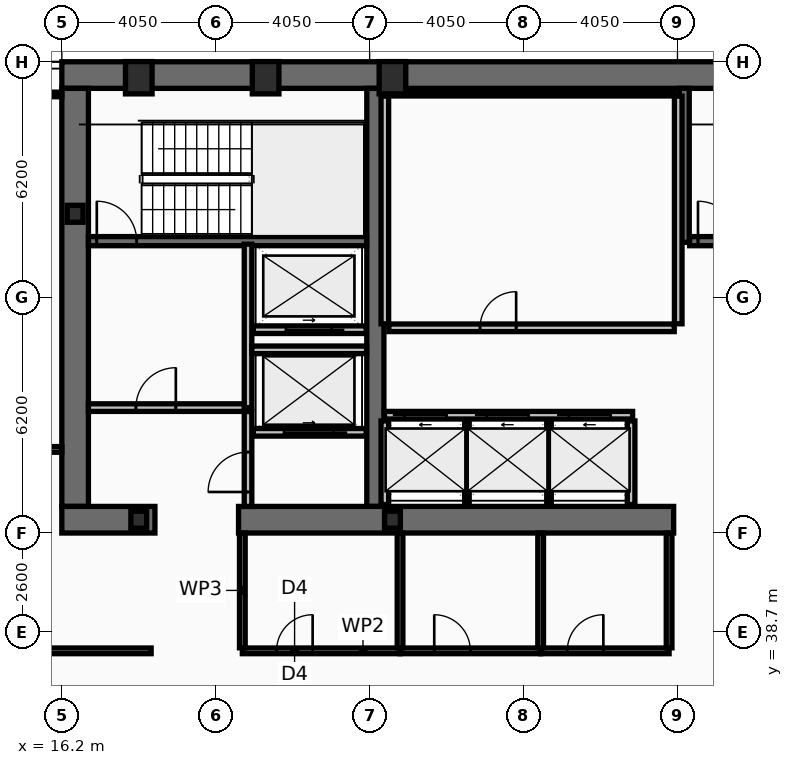
"""IFC4 building model, lengths in metres.
Left out: names, types, materials, properties, quantities, classifications, styles, units other than length and angle.
Written with IfcOpenShell. Run it as: python <this file> out.ifc"""

import sys

from ifc_helpers import new_model, si_unit, direction, frame, frame_2d, origin, origin_2d, place, context, subcontext, project, spatial, rectangle, hollow_rectangle, i_section, extrude, element, fill, save


model = new_model("IFC4")
c1 = context("Model", 3, precision=1e-05, world=origin(), true_north=direction((0.0, 1.0)))
c2 = subcontext(c1, "Body", "Model", "MODEL_VIEW")
j1 = project(units=[si_unit("LENGTHUNIT", "METRE"), si_unit("PLANEANGLEUNIT", "RADIAN")], contexts=[c1])
p1 = place(None, origin())
s1 = spatial("IfcSite", under=j1, at=p1, CompositionType="ELEMENT")
p2 = place(p1, origin())
s2 = spatial("IfcBuilding", under=s1, at=p2, CompositionType="ELEMENT")
p3 = place(p2, frame((0.0, 0.0, 139.8)))
s3 = spatial("IfcBuildingStorey", under=s2, at=p3, CompositionType="ELEMENT", Elevation=139.8)
p4 = place(p3, frame((16.2, 53.35, 0.0), z_axis=(0.0, 0.0, 1.0), x_axis=(1.0, 0.0, 0.0)))
e1 = element("IfcWall", 1, at=p4, inside=s3, PredefinedType="SHEAR", context=c2, shape_type="SweptSolid", body=[
    extrude(rectangle(XDim=40.5, YDim=0.7, at=frame_2d((20.25, 0.0))), origin(), (0.0, 0.0, 1.0), 3.44),
])
p5 = place(p3, frame((16.55, 42.0, 0.0), z_axis=(0.0, 0.0, 1.0), x_axis=(0.0, 1.0, 0.0)))
e2 = element("IfcWall", 2, at=p5, inside=s3, PredefinedType="SHEAR", context=c2, shape_type="SweptSolid", body=[
    extrude(rectangle(XDim=11.0, YDim=0.7, at=frame_2d((5.5, 0.0))), origin(), (0.0, 0.0, 1.0), 3.44),
])
p6 = place(p3, frame((24.45, 42.0, 0.0), z_axis=(0.0, 0.0, 1.0), x_axis=(0.0, 1.0, 0.0)))
e3 = element("IfcWall", 3, at=p6, inside=s3, PredefinedType="SHEAR", context=c2, shape_type="SweptSolid", body=[
    extrude(rectangle(XDim=11.0, YDim=0.45, at=frame_2d((5.5, 0.0))), origin(), (0.0, 0.0, 1.0), 3.44),
])
p7 = place(p3, frame((18.65, 41.65, 0.0), z_axis=(0.0, 0.0, 1.0), x_axis=(-1.0, 0.0, 0.0)))
e4 = element("IfcWall", 4, at=p7, inside=s3, PredefinedType="SHEAR", context=c2, shape_type="SweptSolid", body=[
    extrude(rectangle(XDim=2.45, YDim=0.7, at=frame_2d((1.225, 0.0))), origin(), (0.0, 0.0, 1.0), 3.44),
])
p8 = place(p3, frame((32.3, 41.65, 0.0), z_axis=(0.0, 0.0, 1.0), x_axis=(-1.0, 0.0, 0.0)))
e5 = element("IfcWall", 5, at=p8, inside=s3, PredefinedType="SHEAR", context=c2, shape_type="SweptSolid", body=[
    extrude(rectangle(XDim=11.45, YDim=0.7, at=frame_2d((5.725, 0.0))), origin(), (0.0, 0.0, 1.0), 3.44),
])
p9 = place(p3, frame((32.58, 48.95, 0.0), z_axis=(0.0, 0.0, 1.0), x_axis=(0.0, 1.0, 0.0)))
e6 = element("IfcWall", 6, at=p9, inside=s3, PredefinedType="SHEAR", context=c2, shape_type="SweptSolid", body=[
    extrude(rectangle(XDim=4.05, YDim=0.26, at=frame_2d((2.025, 0.0))), origin(), (0.0, 0.0, 1.0), 3.44),
])
p10 = place(p3, frame((16.9, 48.98, 0.0), z_axis=(0.0, 0.0, 1.0), x_axis=(1.0, 0.0, 0.0)))
e7 = element("IfcWall", 7, at=p10, inside=s3, PredefinedType="SHEAR", context=c2, shape_type="SweptSolid", body=[
    extrude(rectangle(XDim=7.32, YDim=0.24, at=frame_2d((3.66, 0.0))), origin(), (0.0, 0.0, 1.0), 3.44),
])
p11 = place(p10, frame((0.22, 0.0, 0.0)))
e8 = element("IfcOpeningElement", 8, at=p11, cuts=e7, PredefinedType="OPENING", context=c2, shape_type="SweptSolid", body=[
    extrude(rectangle(XDim=1.05, YDim=2.15, at=frame_2d((0.525, 1.075))), frame((0.0, 0.13, 0.0), z_axis=(0.0, -1.0, 0.0), x_axis=(1.0, 0.0, 0.0)), (0.0, 0.0, 1.0), 0.26),
])
p12 = place(p3, frame((32.72, 48.98, 0.0), z_axis=(0.0, 0.0, 1.0), x_axis=(1.0, 0.0, 0.0)))
e9 = element("IfcWall", 9, at=p12, inside=s3, PredefinedType="SHEAR", context=c2, shape_type="SweptSolid", body=[
    extrude(rectangle(XDim=7.56, YDim=0.24, at=frame_2d((3.78, 0.0))), origin(), (0.0, 0.0, 1.0), 3.44),
])
p13 = place(p12, frame((0.22, 0.0, 0.0)))
e10 = element("IfcOpeningElement", 10, at=p13, cuts=e9, PredefinedType="OPENING", context=c2, shape_type="SweptSolid", body=[
    extrude(rectangle(XDim=1.05, YDim=2.15, at=frame_2d((0.525, 1.075))), frame((0.0, 0.13, 0.0), z_axis=(0.0, -1.0, 0.0), x_axis=(1.0, 0.0, 0.0)), (0.0, 0.0, 1.0), 0.26),
])
for number, where, z_axis, x_axis in (
    (11, (18.225, 53.28, 0.0), (0.0, 0.0, 1.0), (1.0, 0.0, 0.0)),
    (12, (21.562, 53.28, 0.0), (0.0, 0.0, 1.0), (1.0, 0.0, 0.0)),
    (13, (24.9, 53.28, 0.0), (0.0, 0.0, 1.0), (1.0, 0.0, 0.0)),
):
    element("IfcColumn", number, at=place(p3, frame(where, z_axis=z_axis, x_axis=x_axis)), inside=s3, PredefinedType="COLUMN", context=c2, shape_type="SweptSolid", body=[
        extrude(hollow_rectangle(XDim=0.7, YDim=0.85, WallThickness=0.05, at=origin_2d()), origin(), (0.0, 0.0, 1.0), 3.6),
    ])
for number, where, z_axis, x_axis in (
    (14, (16.55, 49.7, 0.0), (0.0, 0.0, 1.0), (1.0, 0.0, 0.0)),
    (15, (18.225, 41.65, 0.0), (0.0, 0.0, 1.0), (1.0, 0.0, 0.0)),
    (16, (24.9, 41.65, 0.0), (0.0, 0.0, 1.0), (1.0, 0.0, 0.0)),
):
    element("IfcColumn", number, at=place(p3, frame(where, z_axis=z_axis, x_axis=x_axis)), inside=s3, PredefinedType="COLUMN", context=c2, shape_type="SweptSolid", body=[
        extrude(i_section(OverallWidth=0.416, OverallDepth=0.446, WebThickness=0.039, FlangeThickness=0.063, at=origin_2d()), origin(), (0.0, 0.0, 1.0), 3.6),
    ])
p14 = place(p3, frame((24.69, 44.4, 0.0), z_axis=(0.0, 0.0, 1.0), x_axis=(1.0, 0.0, 0.0)))
e17 = element("IfcWall", 17, at=p14, inside=s3, PredefinedType="PARTITIONING", context=c2, shape_type="SweptSolid", body=[
    extrude(rectangle(XDim=6.53, YDim=0.2, at=frame_2d((3.265, 0.0))), origin(), (0.0, 0.0, 1.0), 3.44),
])
p15 = place(p14, frame((0.53, 0.0, 0.0)))
e18 = element("IfcOpeningElement", 18, at=p15, cuts=e17, PredefinedType="OPENING", context=c2, shape_type="SweptSolid", body=[
    extrude(rectangle(XDim=1.1, YDim=2.18, at=frame_2d((0.55, 1.09))), frame((0.0, 0.11, 0.0), z_axis=(0.0, -1.0, 0.0), x_axis=(1.0, 0.0, 0.0)), (0.0, 0.0, 1.0), 0.22),
])
p16 = place(p14, frame((2.69, 0.0, 0.0)))
e19 = element("IfcOpeningElement", 19, at=p16, cuts=e17, PredefinedType="OPENING", context=c2, shape_type="SweptSolid", body=[
    extrude(rectangle(XDim=1.1, YDim=2.18, at=frame_2d((0.55, 1.09))), frame((0.0, 0.11, 0.0), z_axis=(0.0, -1.0, 0.0), x_axis=(1.0, 0.0, 0.0)), (0.0, 0.0, 1.0), 0.22),
])
p17 = place(p14, frame((4.85, 0.0, 0.0)))
e20 = element("IfcOpeningElement", 20, at=p17, cuts=e17, PredefinedType="OPENING", context=c2, shape_type="SweptSolid", body=[
    extrude(rectangle(XDim=1.1, YDim=2.18, at=frame_2d((0.55, 1.09))), frame((0.0, 0.11, 0.0), z_axis=(0.0, -1.0, 0.0), x_axis=(1.0, 0.0, 0.0)), (0.0, 0.0, 1.0), 0.22),
])
p18 = place(p3, frame((24.21, 43.95, 0.0), z_axis=(0.0, 0.0, 1.0), x_axis=(-1.0, 0.0, 0.0)))
e21 = element("IfcWall", 21, at=p18, inside=s3, PredefinedType="PARTITIONING", context=c2, shape_type="SweptSolid", body=[
    extrude(rectangle(XDim=2.97, YDim=0.2, at=frame_2d((1.485, 0.0))), origin(), (0.0, 0.0, 1.0), 3.44),
])
p19 = place(p18, frame((0.86, 0.0, 0.0)))
e22 = element("IfcOpeningElement", 22, at=p19, cuts=e21, PredefinedType="OPENING", context=c2, shape_type="SweptSolid", body=[
    extrude(rectangle(XDim=1.3, YDim=2.18, at=frame_2d((0.65, 1.09))), frame((0.0, 0.11, 0.0), z_axis=(0.0, -1.0, 0.0), x_axis=(1.0, 0.0, 0.0)), (0.0, 0.0, 1.0), 0.22),
])
p20 = place(p3, frame((24.21, 46.65, 0.0), z_axis=(0.0, 0.0, 1.0), x_axis=(-1.0, 0.0, 0.0)))
e23 = element("IfcWall", 23, at=p20, inside=s3, PredefinedType="PARTITIONING", context=c2, shape_type="SweptSolid", body=[
    extrude(rectangle(XDim=2.97, YDim=0.2, at=frame_2d((1.485, 0.0))), origin(), (0.0, 0.0, 1.0), 3.44),
])
p21 = place(p20, frame((0.91, 0.0, 0.0)))
e24 = element("IfcOpeningElement", 24, at=p21, cuts=e23, PredefinedType="OPENING", context=c2, shape_type="SweptSolid", body=[
    extrude(rectangle(XDim=1.2, YDim=2.18, at=frame_2d((0.6, 1.09))), frame((0.0, 0.11, 0.0), z_axis=(0.0, -1.0, 0.0), x_axis=(1.0, 0.0, 0.0)), (0.0, 0.0, 1.0), 0.22),
])
p22 = place(p3, frame((21.1, 44.6, 0.0), z_axis=(0.0, 0.0, 1.0), x_axis=(0.0, 1.0, 0.0)))
e25 = element("IfcWall", 25, at=p22, inside=s3, PredefinedType="PARTITIONING", context=c2, shape_type="SweptSolid", body=[
    extrude(rectangle(XDim=4.3, YDim=0.2, at=frame_2d((2.15, 0.0))), origin(), (0.0, 0.0, 1.0), 3.44),
])
p23 = place(p3, frame((16.9, 44.6, 0.0), z_axis=(0.0, 0.0, 1.0), x_axis=(1.0, 0.0, 0.0)))
e26 = element("IfcWall", 26, at=p23, inside=s3, PredefinedType="PARTITIONING", context=c2, shape_type="SweptSolid", body=[
    extrude(rectangle(XDim=4.1, YDim=0.2, at=frame_2d((2.05, 0.0))), origin(), (0.0, 0.0, 1.0), 3.44),
])
p24 = place(p23, frame((1.25, 0.0, 0.0)))
e27 = element("IfcOpeningElement", 27, at=p24, cuts=e26, PredefinedType="OPENING", context=c2, shape_type="SweptSolid", body=[
    extrude(rectangle(XDim=1.05, YDim=2.15, at=frame_2d((0.525, 1.075))), frame((0.0, 0.11, 0.0), z_axis=(0.0, -1.0, 0.0), x_axis=(1.0, 0.0, 0.0)), (0.0, 0.0, 1.0), 0.22),
])
p25 = place(p3, frame((21.2, 46.12, 0.0), z_axis=(0.0, 0.0, 1.0), x_axis=(1.0, 0.0, 0.0)))
e28 = element("IfcWall", 28, at=p25, inside=s3, PredefinedType="PARTITIONING", context=c2, shape_type="SweptSolid", body=[
    extrude(rectangle(XDim=3.02, YDim=0.2, at=frame_2d((1.51, 0.0))), origin(), (0.0, 0.0, 1.0), 3.44),
])
p26 = place(p3, frame((21.1, 42.0, 0.0), z_axis=(0.0, 0.0, 1.0), x_axis=(0.0, 1.0, 0.0)))
e29 = element("IfcWall", 29, at=p26, inside=s3, PredefinedType="PARTITIONING", context=c2, shape_type="SweptSolid", body=[
    extrude(rectangle(XDim=2.495, YDim=0.2, at=frame_2d((1.248, 0.0))), origin(), (0.0, 0.0, 1.0), 3.44),
])
p27 = place(p26, frame((0.38, 0.0, 0.0)))
e30 = element("IfcOpeningElement", 30, at=p27, cuts=e29, PredefinedType="OPENING", context=c2, shape_type="SweptSolid", body=[
    extrude(rectangle(XDim=1.05, YDim=2.15, at=frame_2d((0.525, 1.075))), frame((0.0, 0.11, 0.0), z_axis=(0.0, -1.0, 0.0), x_axis=(1.0, 0.0, 0.0)), (0.0, 0.0, 1.0), 0.22),
])
for number, where, z_axis, x_axis in (
    (31, (24.7, 46.805, 0.0), (0.0, 0.0, 1.0), (0.0, 1.0, 0.0)),
    (32, (32.42, 46.805, 0.0), (0.0, 0.0, 1.0), (0.0, 1.0, 0.0)),
):
    element("IfcWall", number, at=place(p3, frame(where, z_axis=z_axis, x_axis=x_axis)), inside=s3, PredefinedType="PARTITIONING", context=c2, shape_type="SweptSolid", body=[
        extrude(rectangle(XDim=5.99, YDim=0.2, at=frame_2d((2.995, 0.0))), origin(), (0.0, 0.0, 1.0), 3.44),
    ])
p28 = place(p3, frame((24.805, 52.86, 0.0), z_axis=(0.0, 0.0, 1.0), x_axis=(1.0, 0.0, 0.0)))
e33 = element("IfcWall", 33, at=p28, inside=s3, PredefinedType="PARTITIONING", context=c2, shape_type="SweptSolid", body=[
    extrude(rectangle(XDim=7.51, YDim=0.12, at=frame_2d((3.755, 0.0))), origin(), (0.0, 0.0, 1.0), 3.44),
])
p29 = place(p3, frame((24.805, 46.7, 0.0), z_axis=(0.0, 0.0, 1.0), x_axis=(1.0, 0.0, 0.0)))
e34 = element("IfcWall", 34, at=p29, inside=s3, PredefinedType="PARTITIONING", context=c2, shape_type="SweptSolid", body=[
    extrude(rectangle(XDim=7.51, YDim=0.2, at=frame_2d((3.755, 0.0))), origin(), (0.0, 0.0, 1.0), 3.44),
])
p30 = place(p29, frame((2.4, 0.0, 0.0)))
e35 = element("IfcOpeningElement", 35, at=p30, cuts=e34, PredefinedType="OPENING", context=c2, shape_type="SweptSolid", body=[
    extrude(rectangle(XDim=0.95, YDim=2.1, at=frame_2d((0.475, 1.05))), frame((0.0, 0.11, 0.0), z_axis=(0.0, -1.0, 0.0), x_axis=(1.0, 0.0, 0.0)), (0.0, 0.0, 1.0), 0.22),
])
for number, where, z_axis, x_axis in (
    (36, (24.7, 42.05, 0.0), (0.0, 0.0, 1.0), (0.0, 1.0, 0.0)),
    (37, (31.18, 42.05, 0.0), (0.0, 0.0, 1.0), (0.0, 1.0, 0.0)),
):
    element("IfcWall", number, at=place(p3, frame(where, z_axis=z_axis, x_axis=x_axis)), inside=s3, PredefinedType="PARTITIONING", context=c2, shape_type="SweptSolid", body=[
        extrude(rectangle(XDim=2.2, YDim=0.2, at=frame_2d((1.1, 0.0))), origin(), (0.0, 0.0, 1.0), 3.44),
    ])
for number, where, z_axis, x_axis in (
    (38, (26.86, 42.05, 0.0), (0.0, 0.0, 1.0), (0.0, 1.0, 0.0)),
    (39, (29.02, 42.05, 0.0), (0.0, 0.0, 1.0), (0.0, 1.0, 0.0)),
):
    element("IfcWall", number, at=place(p3, frame(where, z_axis=z_axis, x_axis=x_axis)), inside=s3, PredefinedType="PARTITIONING", context=c2, shape_type="SweptSolid", body=[
        extrude(rectangle(XDim=2.2, YDim=0.12, at=frame_2d((1.1, 0.0))), origin(), (0.0, 0.0, 1.0), 3.44),
    ])
p31 = place(p3, frame((20.95, 38.2, 0.0), z_axis=(0.0, 0.0, 1.0), x_axis=(1.0, 0.0, 0.0)))
e40 = element("IfcWall", 40, at=p31, inside=s3, PredefinedType="PARTITIONING", context=c2, shape_type="SweptSolid", body=[
    extrude(rectangle(XDim=4.15, YDim=0.15, at=frame_2d((2.075, 0.0))), origin(), (0.0, 0.0, 1.0), 2.73),
])
p32 = place(p31, frame((0.9, 0.0, 0.0)))
e41 = element("IfcOpeningElement", 41, at=p32, cuts=e40, PredefinedType="OPENING", context=c2, shape_type="SweptSolid", body=[
    extrude(rectangle(XDim=0.95, YDim=2.05, at=frame_2d((0.475, 1.025))), frame((0.0, 0.085, 0.0), z_axis=(0.0, -1.0, 0.0), x_axis=(1.0, 0.0, 0.0)), (0.0, 0.0, 1.0), 0.17),
])
p33 = place(p3, frame((25.1, 38.2, 0.0), z_axis=(0.0, 0.0, 1.0), x_axis=(1.0, 0.0, 0.0)))
e42 = element("IfcWall", 42, at=p33, inside=s3, PredefinedType="PARTITIONING", context=c2, shape_type="SweptSolid", body=[
    extrude(rectangle(XDim=3.7, YDim=0.15, at=frame_2d((1.85, 0.0))), origin(), (0.0, 0.0, 1.0), 2.73),
])
p34 = place(p33, frame((0.9, 0.0, 0.0)))
e43 = element("IfcOpeningElement", 43, at=p34, cuts=e42, PredefinedType="OPENING", context=c2, shape_type="SweptSolid", body=[
    extrude(rectangle(XDim=0.95, YDim=2.05, at=frame_2d((0.475, 1.025))), frame((0.0, 0.085, 0.0), z_axis=(0.0, -1.0, 0.0), x_axis=(1.0, 0.0, 0.0)), (0.0, 0.0, 1.0), 0.17),
])
p35 = place(p3, frame((28.8, 38.2, 0.0), z_axis=(0.0, 0.0, 1.0), x_axis=(1.0, 0.0, 0.0)))
e44 = element("IfcWall", 44, at=p35, inside=s3, PredefinedType="PARTITIONING", context=c2, shape_type="SweptSolid", body=[
    extrude(rectangle(XDim=3.38, YDim=0.15, at=frame_2d((1.69, 0.0))), origin(), (0.0, 0.0, 1.0), 2.73),
])
p36 = place(p35, frame((0.7, 0.0, 0.0)))
e45 = element("IfcOpeningElement", 45, at=p36, cuts=e44, PredefinedType="OPENING", context=c2, shape_type="SweptSolid", body=[
    extrude(rectangle(XDim=0.95, YDim=2.05, at=frame_2d((0.475, 1.025))), frame((0.0, 0.085, 0.0), z_axis=(0.0, -1.0, 0.0), x_axis=(1.0, 0.0, 0.0)), (0.0, 0.0, 1.0), 0.17),
])
p37 = place(p3, frame((20.95, 38.28, 0.0), z_axis=(0.0, 0.0, 1.0), x_axis=(0.0, 1.0, 0.0)))
e46 = element("IfcWall", 46, at=p37, inside=s3, PredefinedType="PARTITIONING", context=c2, shape_type="SweptSolid", body=[
    extrude(rectangle(XDim=3.02, YDim=0.15, at=frame_2d((1.51, 0.0))), origin(), (0.0, 0.0, 1.0), 3.44),
])
p38 = place(p3, frame((25.1, 38.28, 0.0), z_axis=(0.0, 0.0, 1.0), x_axis=(0.0, 1.0, 0.0)))
e47 = element("IfcWall", 47, at=p38, inside=s3, PredefinedType="PARTITIONING", context=c2, shape_type="SweptSolid", body=[
    extrude(rectangle(XDim=3.02, YDim=0.15, at=frame_2d((1.51, 0.0))), origin(), (0.0, 0.0, 1.0), 2.73),
])
for number, where, z_axis, x_axis in (
    (48, (28.8, 38.28, 0.0), (0.0, 0.0, 1.0), (0.0, 1.0, 0.0)),
    (49, (32.18, 38.28, 0.0), (0.0, 0.0, 1.0), (0.0, 1.0, 0.0)),
):
    element("IfcWall", number, at=place(p3, frame(where, z_axis=z_axis, x_axis=x_axis)), inside=s3, PredefinedType="PARTITIONING", context=c2, shape_type="SweptSolid", body=[
        extrude(rectangle(XDim=3.02, YDim=0.15, at=frame_2d((1.51, 0.0))), origin(), (0.0, 0.0, 1.0), 3.44),
    ])
p39 = place(p3, frame((6.03, 38.2, 0.0), z_axis=(0.0, 0.0, 1.0), x_axis=(1.0, 0.0, 0.0)))
e50 = element("IfcWall", 50, at=p39, inside=s3, PredefinedType="PARTITIONING", context=c2, shape_type="SweptSolid", body=[
    extrude(rectangle(XDim=12.52, YDim=0.15, at=frame_2d((6.26, 0.0))), origin(), (0.0, 0.0, 1.0), 2.73),
])
p40 = place(p39, frame((8.32, 0.0, 0.0)))
e51 = element("IfcOpeningElement", 51, at=p40, cuts=e50, PredefinedType="OPENING", context=c2, shape_type="SweptSolid", body=[
    extrude(rectangle(XDim=0.95, YDim=2.05, at=frame_2d((0.475, 1.025))), frame((0.0, 0.085, 0.0), z_axis=(0.0, -1.0, 0.0), x_axis=(1.0, 0.0, 0.0)), (0.0, 0.0, 1.0), 0.17),
])
p41 = place(p3, frame((6.095, 43.5, 0.0), z_axis=(0.0, 0.0, 1.0), x_axis=(1.0, 0.0, 0.0)))
e52 = element("IfcWall", 52, at=p41, inside=s3, PredefinedType="PARTITIONING", context=c2, shape_type="SweptSolid", body=[
    extrude(rectangle(XDim=10.105, YDim=0.15, at=frame_2d((5.052, 0.0))), origin(), (0.0, 0.0, 1.0), 2.73),
])
p42 = place(p41, frame((8.32, 0.0, 0.0)))
e53 = element("IfcOpeningElement", 53, at=p42, cuts=e52, PredefinedType="OPENING", context=c2, shape_type="SweptSolid", body=[
    extrude(rectangle(XDim=0.9, YDim=2.05, at=frame_2d((0.45, 1.025))), frame((0.0, 0.085, 0.0), z_axis=(0.0, -1.0, 0.0), x_axis=(1.0, 0.0, 0.0)), (0.0, 0.0, 1.0), 0.17),
])
p43 = place(p3, frame((6.095, 52.84, 0.0), z_axis=(0.0, 0.0, 1.0), x_axis=(1.0, 0.0, 0.0)))
e54 = element("IfcWall", 54, at=p43, inside=s3, PredefinedType="PARTITIONING", context=c2, shape_type="SweptSolid", body=[
    extrude(rectangle(XDim=10.105, YDim=0.12, at=frame_2d((5.052, 0.0))), origin(), (0.0, 0.0, 1.0), 3.44),
])
p44 = place(p11, origin())
e55 = element("IfcDoor", 55, at=p44, inside=s3, OperationType="SINGLE_SWING_LEFT", PredefinedType="DOOR", context=c2, shape_type="SweptSolid", body=[
    extrude(rectangle(XDim=1.05, YDim=2.15, at=frame_2d((0.525, 1.075))), frame((0.0, 0.025, 0.0), z_axis=(0.0, -1.0, 0.0), x_axis=(1.0, 0.0, 0.0)), (0.0, 0.0, 1.0), 0.05),
])
fill(e8, e55)
p45 = place(p13, origin())
e56 = element("IfcDoor", 56, at=p45, inside=s3, OperationType="SINGLE_SWING_LEFT", PredefinedType="DOOR", context=c2, shape_type="SweptSolid", body=[
    extrude(rectangle(XDim=1.05, YDim=2.15, at=frame_2d((0.525, 1.075))), frame((0.0, 0.025, 0.0), z_axis=(0.0, -1.0, 0.0), x_axis=(1.0, 0.0, 0.0)), (0.0, 0.0, 1.0), 0.05),
])
fill(e10, e56)
p46 = place(p15, origin())
e57 = element("IfcDoor", 57, at=p46, inside=s3, OperationType="SLIDING_TO_LEFT", PredefinedType="DOOR", context=c2, shape_type="SweptSolid", body=[
    extrude(rectangle(XDim=1.1, YDim=2.18, at=frame_2d((0.55, 1.09))), frame((0.0, 0.025, 0.0), z_axis=(0.0, -1.0, 0.0), x_axis=(1.0, 0.0, 0.0)), (0.0, 0.0, 1.0), 0.05),
])
fill(e18, e57)
p47 = place(p16, origin())
e58 = element("IfcDoor", 58, at=p47, inside=s3, OperationType="SLIDING_TO_LEFT", PredefinedType="DOOR", context=c2, shape_type="SweptSolid", body=[
    extrude(rectangle(XDim=1.1, YDim=2.18, at=frame_2d((0.55, 1.09))), frame((0.0, 0.025, 0.0), z_axis=(0.0, -1.0, 0.0), x_axis=(1.0, 0.0, 0.0)), (0.0, 0.0, 1.0), 0.05),
])
fill(e19, e58)
p48 = place(p17, origin())
e59 = element("IfcDoor", 59, at=p48, inside=s3, OperationType="SLIDING_TO_LEFT", PredefinedType="DOOR", context=c2, shape_type="SweptSolid", body=[
    extrude(rectangle(XDim=1.1, YDim=2.18, at=frame_2d((0.55, 1.09))), frame((0.0, 0.025, 0.0), z_axis=(0.0, -1.0, 0.0), x_axis=(1.0, 0.0, 0.0)), (0.0, 0.0, 1.0), 0.05),
])
fill(e20, e59)
p49 = place(p19, origin())
e60 = element("IfcDoor", 60, at=p49, inside=s3, OperationType="SLIDING_TO_LEFT", PredefinedType="DOOR", context=c2, shape_type="SweptSolid", body=[
    extrude(rectangle(XDim=1.3, YDim=2.18, at=frame_2d((0.65, 1.09))), frame((0.0, 0.025, 0.0), z_axis=(0.0, -1.0, 0.0), x_axis=(1.0, 0.0, 0.0)), (0.0, 0.0, 1.0), 0.05),
])
fill(e22, e60)
p50 = place(p21, origin())
e61 = element("IfcDoor", 61, at=p50, inside=s3, OperationType="SLIDING_TO_LEFT", PredefinedType="DOOR", context=c2, shape_type="SweptSolid", body=[
    extrude(rectangle(XDim=1.2, YDim=2.18, at=frame_2d((0.6, 1.09))), frame((0.0, 0.025, 0.0), z_axis=(0.0, -1.0, 0.0), x_axis=(1.0, 0.0, 0.0)), (0.0, 0.0, 1.0), 0.05),
])
fill(e24, e61)
p51 = place(p24, origin())
e62 = element("IfcDoor", 62, at=p51, inside=s3, OperationType="SINGLE_SWING_RIGHT", PredefinedType="DOOR", context=c2, shape_type="SweptSolid", body=[
    extrude(rectangle(XDim=1.05, YDim=2.15, at=frame_2d((0.525, 1.075))), frame((0.0, 0.025, 0.0), z_axis=(0.0, -1.0, 0.0), x_axis=(1.0, 0.0, 0.0)), (0.0, 0.0, 1.0), 0.05),
])
fill(e27, e62)
p52 = place(p27, origin())
e63 = element("IfcDoor", 63, at=p52, inside=s3, OperationType="SINGLE_SWING_LEFT", PredefinedType="DOOR", context=c2, shape_type="SweptSolid", body=[
    extrude(rectangle(XDim=1.05, YDim=2.15, at=frame_2d((0.525, 1.075))), frame((0.0, 0.025, 0.0), z_axis=(0.0, -1.0, 0.0), x_axis=(1.0, 0.0, 0.0)), (0.0, 0.0, 1.0), 0.05),
])
fill(e30, e63)
p53 = place(p30, origin())
e64 = element("IfcDoor", 64, at=p53, inside=s3, OperationType="SINGLE_SWING_RIGHT", PredefinedType="DOOR", context=c2, shape_type="SweptSolid", body=[
    extrude(rectangle(XDim=0.95, YDim=2.1, at=frame_2d((0.475, 1.05))), frame((0.0, 0.025, 0.0), z_axis=(0.0, -1.0, 0.0), x_axis=(1.0, 0.0, 0.0)), (0.0, 0.0, 1.0), 0.05),
])
fill(e35, e64)
p54 = place(p32, origin())
e65 = element("IfcDoor", 65, at=p54, inside=s3, OperationType="SINGLE_SWING_RIGHT", PredefinedType="DOOR", context=c2, shape_type="SweptSolid", body=[
    extrude(rectangle(XDim=0.95, YDim=2.05, at=frame_2d((0.475, 1.025))), frame((0.0, 0.025, 0.0), z_axis=(0.0, -1.0, 0.0), x_axis=(1.0, 0.0, 0.0)), (0.0, 0.0, 1.0), 0.05),
])
fill(e41, e65)
p55 = place(p34, origin())
e66 = element("IfcDoor", 66, at=p55, inside=s3, OperationType="SINGLE_SWING_LEFT", PredefinedType="DOOR", context=c2, shape_type="SweptSolid", body=[
    extrude(rectangle(XDim=0.95, YDim=2.05, at=frame_2d((0.475, 1.025))), frame((0.0, 0.025, 0.0), z_axis=(0.0, -1.0, 0.0), x_axis=(1.0, 0.0, 0.0)), (0.0, 0.0, 1.0), 0.05),
])
fill(e43, e66)
p56 = place(p36, origin())
e67 = element("IfcDoor", 67, at=p56, inside=s3, OperationType="SINGLE_SWING_RIGHT", PredefinedType="DOOR", context=c2, shape_type="SweptSolid", body=[
    extrude(rectangle(XDim=0.95, YDim=2.05, at=frame_2d((0.475, 1.025))), frame((0.0, 0.025, 0.0), z_axis=(0.0, -1.0, 0.0), x_axis=(1.0, 0.0, 0.0)), (0.0, 0.0, 1.0), 0.05),
])
fill(e45, e67)
save(model, sys.argv[1])
